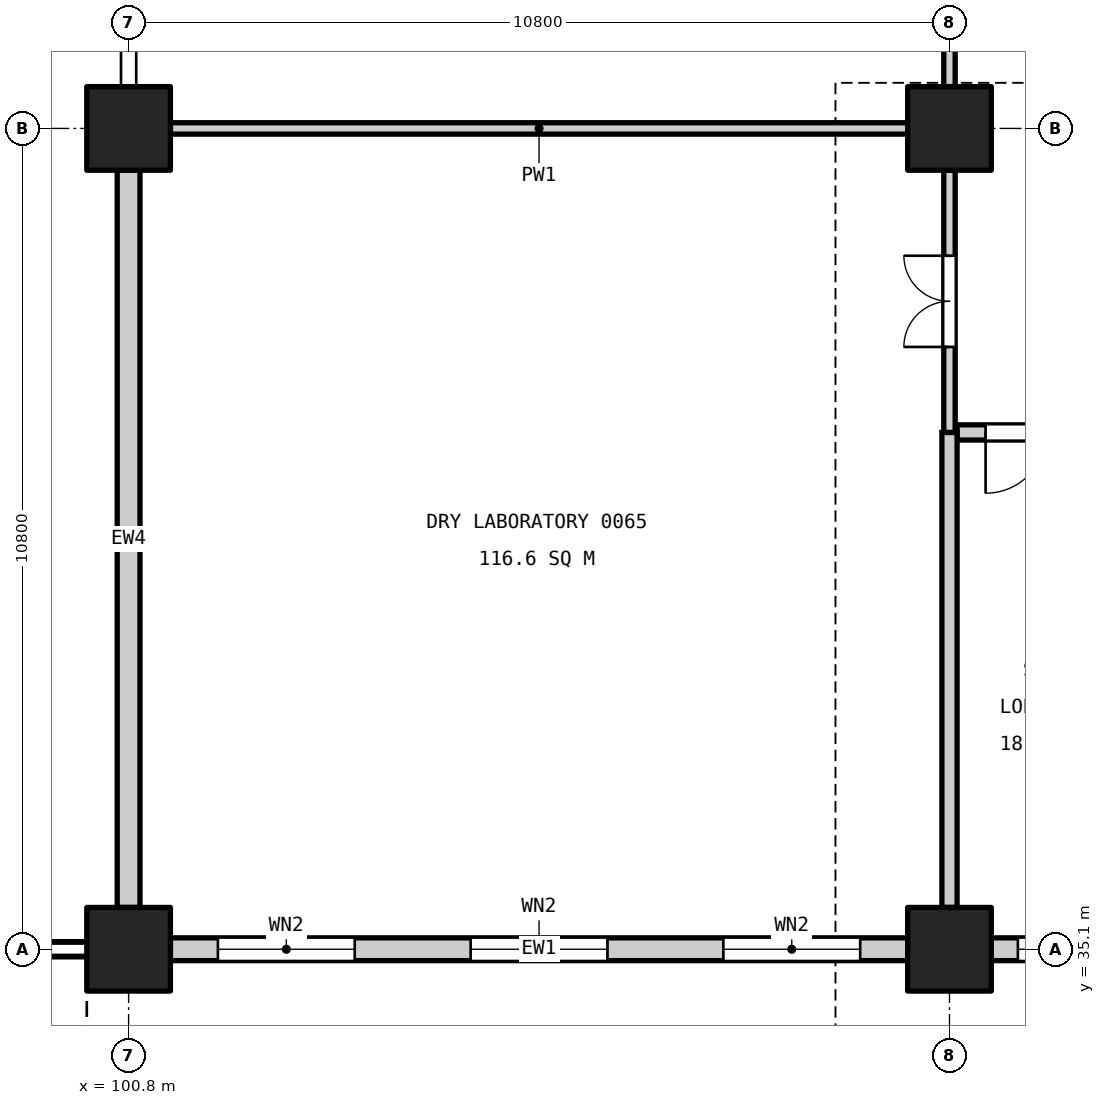
"""IFC4 building model, lengths in metres.
Left out: names, types, materials, properties, quantities, classifications, styles, units other than length and angle.
Written with IfcOpenShell. Run it as: python <this file> out.ifc"""

import sys

from ifc_helpers import new_model, si_unit, direction, frame, frame_2d, origin, origin_2d, place, context, subcontext, project, spatial, rectangle, extrude, element, fill, save


model = new_model("IFC4")
c1 = context("Model", 3, precision=1e-05, world=origin(), true_north=direction((0.0, 1.0)))
c2 = subcontext(c1, "Body", "Model", "MODEL_VIEW")
j1 = project(units=[si_unit("LENGTHUNIT", "METRE"), si_unit("PLANEANGLEUNIT", "RADIAN")], contexts=[c1])
p1 = place(None, origin())
s1 = spatial("IfcSite", under=j1, at=p1, CompositionType="ELEMENT")
p2 = place(p1, origin())
s2 = spatial("IfcBuilding", under=s1, at=p2, CompositionType="ELEMENT")
p3 = place(p2, origin())
s3 = spatial("IfcBuildingStorey", under=s2, at=p3, CompositionType="ELEMENT", Elevation=0.0)
for number, where, z_axis, x_axis in (
    (1, (111.6, 35.1, 0.0), (0.0, 0.0, 1.0), (1.0, 0.0, 0.0)),
    (2, (111.6, 45.9, 0.0), (0.0, 0.0, 1.0), (1.0, 0.0, 0.0)),
    (3, (100.8, 35.1, 0.0), (0.0, 0.0, 1.0), (1.0, 0.0, 0.0)),
    (4, (100.8, 45.9, 0.0), (0.0, 0.0, 1.0), (1.0, 0.0, 0.0)),
):
    element("IfcColumn", number, at=place(p3, frame(where, z_axis=z_axis, x_axis=x_axis)), inside=s3, PredefinedType="COLUMN", context=c2, shape_type="SweptSolid", body=[
        extrude(rectangle(XDim=1.1, YDim=1.1, at=origin_2d()), origin(), (0.0, 0.0, 1.0), 6.0),
    ])
p4 = place(p3, frame((79.75, 35.1, 0.0), z_axis=(0.0, 0.0, 1.0), x_axis=(1.0, 0.0, 0.0)))
e5 = element("IfcWall", 5, at=p4, inside=s3, PredefinedType="SOLIDWALL", context=c2, shape_type="SweptSolid", body=[
    extrude(rectangle(XDim=20.5, YDim=0.2, at=frame_2d((10.25, 0.0))), origin(), (0.0, 0.0, 1.0), 2.6),
])
p5 = place(p4, frame((0.608, 0.0, 0.0)))
e6 = element("IfcOpeningElement", 6, at=p5, cuts=e5, PredefinedType="OPENING", context=c2, shape_type="SweptSolid", body=[
    extrude(rectangle(XDim=2.2, YDim=2.4, at=frame_2d((1.1, 1.2))), frame((0.0, 0.11, 0.0), z_axis=(0.0, -1.0, 0.0), x_axis=(1.0, 0.0, 0.0)), (0.0, 0.0, 1.0), 0.22),
])
p6 = place(p4, frame((4.025, 0.0, 0.0)))
e7 = element("IfcOpeningElement", 7, at=p6, cuts=e5, PredefinedType="OPENING", context=c2, shape_type="SweptSolid", body=[
    extrude(rectangle(XDim=2.2, YDim=2.4, at=frame_2d((1.1, 1.2))), frame((0.0, 0.11, 0.0), z_axis=(0.0, -1.0, 0.0), x_axis=(1.0, 0.0, 0.0)), (0.0, 0.0, 1.0), 0.22),
])
p7 = place(p4, frame((7.442, 0.0, 0.0)))
e8 = element("IfcOpeningElement", 8, at=p7, cuts=e5, PredefinedType="OPENING", context=c2, shape_type="SweptSolid", body=[
    extrude(rectangle(XDim=2.2, YDim=2.4, at=frame_2d((1.1, 1.2))), frame((0.0, 0.11, 0.0), z_axis=(0.0, -1.0, 0.0), x_axis=(1.0, 0.0, 0.0)), (0.0, 0.0, 1.0), 0.22),
])
p8 = place(p4, frame((10.858, 0.0, 0.0)))
e9 = element("IfcOpeningElement", 9, at=p8, cuts=e5, PredefinedType="OPENING", context=c2, shape_type="SweptSolid", body=[
    extrude(rectangle(XDim=2.2, YDim=2.4, at=frame_2d((1.1, 1.2))), frame((0.0, 0.11, 0.0), z_axis=(0.0, -1.0, 0.0), x_axis=(1.0, 0.0, 0.0)), (0.0, 0.0, 1.0), 0.22),
])
p9 = place(p4, frame((14.275, 0.0, 0.0)))
e10 = element("IfcOpeningElement", 10, at=p9, cuts=e5, PredefinedType="OPENING", context=c2, shape_type="SweptSolid", body=[
    extrude(rectangle(XDim=2.2, YDim=2.4, at=frame_2d((1.1, 1.2))), frame((0.0, 0.11, 0.0), z_axis=(0.0, -1.0, 0.0), x_axis=(1.0, 0.0, 0.0)), (0.0, 0.0, 1.0), 0.22),
])
p10 = place(p4, frame((17.692, 0.0, 0.0)))
e11 = element("IfcOpeningElement", 11, at=p10, cuts=e5, PredefinedType="OPENING", context=c2, shape_type="SweptSolid", body=[
    extrude(rectangle(XDim=2.2, YDim=2.4, at=frame_2d((1.1, 1.2))), frame((0.0, 0.11, 0.0), z_axis=(0.0, -1.0, 0.0), x_axis=(1.0, 0.0, 0.0)), (0.0, 0.0, 1.0), 0.22),
])
p11 = place(p3, frame((114.05, 35.1, 0.0), z_axis=(0.0, 0.0, 1.0), x_axis=(-1.0, 0.0, 0.0)))
e12 = element("IfcWall", 12, at=p11, inside=s3, PredefinedType="STANDARD", context=c2, shape_type="SweptSolid", body=[
    extrude(rectangle(XDim=1.9, YDim=0.3, at=frame_2d((0.95, 0.0))), origin(), (0.0, 0.0, 1.0), 4.9),
])
p12 = place(p11, frame((0.35, 0.0, 0.9)))
e13 = element("IfcOpeningElement", 13, at=p12, cuts=e12, PredefinedType="OPENING", context=c2, shape_type="SweptSolid", body=[
    extrude(rectangle(XDim=1.2, YDim=2.4, at=frame_2d((0.6, 1.2))), frame((0.0, 0.16, 0.0), z_axis=(0.0, -1.0, 0.0), x_axis=(1.0, 0.0, 0.0)), (0.0, 0.0, 1.0), 0.32),
])
p13 = place(p3, frame((111.05, 35.1, 0.0), z_axis=(0.0, 0.0, 1.0), x_axis=(-1.0, 0.0, 0.0)))
e14 = element("IfcWall", 14, at=p13, inside=s3, PredefinedType="STANDARD", context=c2, shape_type="SweptSolid", body=[
    extrude(rectangle(XDim=9.7, YDim=0.3, at=frame_2d((4.85, 0.0))), origin(), (0.0, 0.0, 1.0), 4.9),
])
p14 = place(p13, frame((0.625, 0.0, 0.9)))
e15 = element("IfcOpeningElement", 15, at=p14, cuts=e14, PredefinedType="OPENING", context=c2, shape_type="SweptSolid", body=[
    extrude(rectangle(XDim=1.8, YDim=3.0, at=frame_2d((0.9, 1.5))), frame((0.0, 0.16, 0.0), z_axis=(0.0, -1.0, 0.0), x_axis=(1.0, 0.0, 0.0)), (0.0, 0.0, 1.0), 0.32),
])
p15 = place(p13, frame((3.95, 0.0, 0.9)))
e16 = element("IfcOpeningElement", 16, at=p15, cuts=e14, PredefinedType="OPENING", context=c2, shape_type="SweptSolid", body=[
    extrude(rectangle(XDim=1.8, YDim=3.0, at=frame_2d((0.9, 1.5))), frame((0.0, 0.16, 0.0), z_axis=(0.0, -1.0, 0.0), x_axis=(1.0, 0.0, 0.0)), (0.0, 0.0, 1.0), 0.32),
])
p16 = place(p13, frame((7.275, 0.0, 0.9)))
e17 = element("IfcOpeningElement", 17, at=p16, cuts=e14, PredefinedType="OPENING", context=c2, shape_type="SweptSolid", body=[
    extrude(rectangle(XDim=1.8, YDim=3.0, at=frame_2d((0.9, 1.5))), frame((0.0, 0.16, 0.0), z_axis=(0.0, -1.0, 0.0), x_axis=(1.0, 0.0, 0.0)), (0.0, 0.0, 1.0), 0.32),
])
p17 = place(p3, frame((100.8, 35.65, 0.0), z_axis=(0.0, 0.0, 1.0), x_axis=(0.0, 1.0, 0.0)))
e18 = element("IfcWall", 18, at=p17, inside=s3, PredefinedType="STANDARD", context=c2, shape_type="SweptSolid", body=[
    extrude(rectangle(XDim=9.7, YDim=0.3, at=frame_2d((4.85, 0.0))), origin(), (0.0, 0.0, 1.0), 4.6),
])
p18 = place(p3, frame((114.05, 41.9, 0.0), z_axis=(0.0, 0.0, 1.0), x_axis=(-1.0, 0.0, 0.0)))
e19 = element("IfcWall", 19, at=p18, inside=s3, PredefinedType="PARTITIONING", context=c2, shape_type="SweptSolid", body=[
    extrude(rectangle(XDim=2.35, YDim=0.2, at=frame_2d((1.175, 0.0))), origin(), (0.0, 0.0, 1.0), 4.6),
])
p19 = place(p18, frame((0.375, 0.0, 0.0)))
e20 = element("IfcOpeningElement", 20, at=p19, cuts=e19, PredefinedType="OPENING", context=c2, shape_type="SweptSolid", body=[
    extrude(rectangle(XDim=1.6, YDim=2.1, at=frame_2d((0.8, 1.05))), frame((0.0, 0.11, 0.0), z_axis=(0.0, -1.0, 0.0), x_axis=(1.0, 0.0, 0.0)), (0.0, 0.0, 1.0), 0.22),
])
p20 = place(p3, frame((111.6, 35.65, 0.0), z_axis=(0.0, 0.0, 1.0), x_axis=(0.0, 1.0, 0.0)))
e21 = element("IfcWall", 21, at=p20, inside=s3, PredefinedType="PARTITIONING", context=c2, shape_type="SweptSolid", body=[
    extrude(rectangle(XDim=6.25, YDim=0.2, at=frame_2d((3.125, 0.0))), origin(), (0.0, 0.0, 1.0), 4.6),
])
p21 = place(p3, frame((111.6, 41.9, 0.0), z_axis=(0.0, 0.0, 1.0), x_axis=(0.0, 1.0, 0.0)))
e22 = element("IfcWall", 22, at=p21, inside=s3, PredefinedType="PARTITIONING", context=c2, shape_type="SweptSolid", body=[
    extrude(rectangle(XDim=3.45, YDim=0.15, at=frame_2d((1.725, 0.0))), origin(), (0.0, 0.0, 1.0), 4.6),
])
p22 = place(p21, frame((1.125, 0.0, 0.0)))
e23 = element("IfcOpeningElement", 23, at=p22, cuts=e22, PredefinedType="OPENING", context=c2, shape_type="SweptSolid", body=[
    extrude(rectangle(XDim=1.2, YDim=2.1, at=frame_2d((0.6, 1.05))), frame((0.0, 0.085, 0.0), z_axis=(0.0, -1.0, 0.0), x_axis=(1.0, 0.0, 0.0)), (0.0, 0.0, 1.0), 0.17),
])
p23 = place(p3, frame((111.6, 46.45, 0.0), z_axis=(0.0, 0.0, 1.0), x_axis=(0.0, 1.0, 0.0)))
e24 = element("IfcWall", 24, at=p23, inside=s3, PredefinedType="PARTITIONING", context=c2, shape_type="SweptSolid", body=[
    extrude(rectangle(XDim=9.7, YDim=0.15, at=frame_2d((4.85, 0.0))), origin(), (0.0, 0.0, 1.0), 4.6),
])
p24 = place(p23, frame((4.25, 0.0, 0.0)))
e25 = element("IfcOpeningElement", 25, at=p24, cuts=e24, PredefinedType="OPENING", context=c2, shape_type="SweptSolid", body=[
    extrude(rectangle(XDim=1.2, YDim=2.1, at=frame_2d((0.6, 1.05))), frame((0.0, 0.085, 0.0), z_axis=(0.0, -1.0, 0.0), x_axis=(1.0, 0.0, 0.0)), (0.0, 0.0, 1.0), 0.17),
])
p25 = place(p23, frame((0.925, 0.0, 0.0)))
e26 = element("IfcOpeningElement", 26, at=p25, cuts=e24, PredefinedType="OPENING", context=c2, shape_type="SweptSolid", body=[
    extrude(rectangle(XDim=1.2, YDim=2.1, at=frame_2d((0.6, 1.05))), frame((0.0, 0.085, 0.0), z_axis=(0.0, -1.0, 0.0), x_axis=(1.0, 0.0, 0.0)), (0.0, 0.0, 1.0), 0.17),
])
p26 = place(p23, frame((7.575, 0.0, 0.0)))
e27 = element("IfcOpeningElement", 27, at=p26, cuts=e24, PredefinedType="OPENING", context=c2, shape_type="SweptSolid", body=[
    extrude(rectangle(XDim=1.2, YDim=2.1, at=frame_2d((0.6, 1.05))), frame((0.0, 0.085, 0.0), z_axis=(0.0, -1.0, 0.0), x_axis=(1.0, 0.0, 0.0)), (0.0, 0.0, 1.0), 0.17),
])
p27 = place(p3, frame((111.05, 45.9, 0.0), z_axis=(0.0, 0.0, 1.0), x_axis=(-1.0, 0.0, 0.0)))
e28 = element("IfcWall", 28, at=p27, inside=s3, PredefinedType="PARTITIONING", context=c2, shape_type="SweptSolid", body=[
    extrude(rectangle(XDim=9.7, YDim=0.15, at=frame_2d((4.85, 0.0))), origin(), (0.0, 0.0, 1.0), 4.9),
])
p28 = place(p12, origin())
e29 = element("IfcWindow", 29, at=p28, inside=s3, PartitioningType="SINGLE_PANEL", PredefinedType="WINDOW", context=c2, shape_type="SweptSolid", body=[
    extrude(rectangle(XDim=1.2, YDim=2.4, at=frame_2d((0.6, 1.2))), frame((0.0, 0.03, 0.0), z_axis=(0.0, -1.0, 0.0), x_axis=(1.0, 0.0, 0.0)), (0.0, 0.0, 1.0), 0.06),
])
fill(e13, e29)
p29 = place(p14, origin())
e30 = element("IfcWindow", 30, at=p29, inside=s3, PartitioningType="SINGLE_PANEL", PredefinedType="WINDOW", context=c2, shape_type="SweptSolid", body=[
    extrude(rectangle(XDim=1.8, YDim=3.0, at=frame_2d((0.9, 1.5))), frame((0.0, 0.03, 0.0), z_axis=(0.0, -1.0, 0.0), x_axis=(1.0, 0.0, 0.0)), (0.0, 0.0, 1.0), 0.06),
])
fill(e15, e30)
p30 = place(p15, origin())
e31 = element("IfcWindow", 31, at=p30, inside=s3, PartitioningType="SINGLE_PANEL", PredefinedType="WINDOW", context=c2, shape_type="SweptSolid", body=[
    extrude(rectangle(XDim=1.8, YDim=3.0, at=frame_2d((0.9, 1.5))), frame((0.0, 0.03, 0.0), z_axis=(0.0, -1.0, 0.0), x_axis=(1.0, 0.0, 0.0)), (0.0, 0.0, 1.0), 0.06),
])
fill(e16, e31)
p31 = place(p16, origin())
e32 = element("IfcWindow", 32, at=p31, inside=s3, PartitioningType="SINGLE_PANEL", PredefinedType="WINDOW", context=c2, shape_type="SweptSolid", body=[
    extrude(rectangle(XDim=1.8, YDim=3.0, at=frame_2d((0.9, 1.5))), frame((0.0, 0.03, 0.0), z_axis=(0.0, -1.0, 0.0), x_axis=(1.0, 0.0, 0.0)), (0.0, 0.0, 1.0), 0.06),
])
fill(e17, e32)
p32 = place(p22, origin())
e33 = element("IfcDoor", 33, at=p32, inside=s3, OperationType="DOUBLE_DOOR_SINGLE_SWING", PredefinedType="DOOR", context=c2, shape_type="SweptSolid", body=[
    extrude(rectangle(XDim=1.2, YDim=2.1, at=frame_2d((0.6, 1.05))), frame((0.0, 0.025, 0.0), z_axis=(0.0, -1.0, 0.0), x_axis=(1.0, 0.0, 0.0)), (0.0, 0.0, 1.0), 0.05),
])
fill(e23, e33)
p33 = place(p19, origin())
e34 = element("IfcDoor", 34, at=p33, inside=s3, OperationType="DOUBLE_DOOR_SINGLE_SWING", PredefinedType="DOOR", context=c2, shape_type="SweptSolid", body=[
    extrude(rectangle(XDim=1.6, YDim=2.1, at=frame_2d((0.8, 1.05))), frame((0.0, 0.025, 0.0), z_axis=(0.0, -1.0, 0.0), x_axis=(1.0, 0.0, 0.0)), (0.0, 0.0, 1.0), 0.05),
])
fill(e20, e34)
save(model, sys.argv[1])
